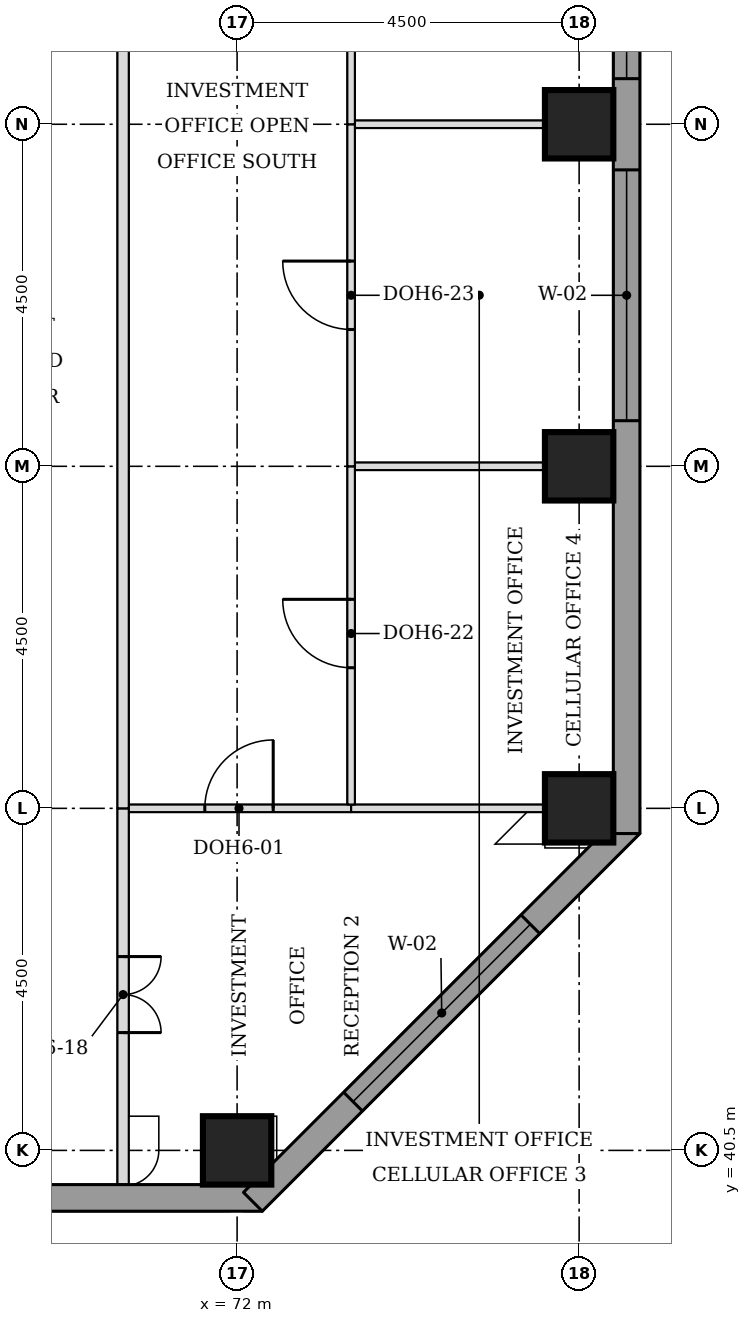
"""IFC4 building model, lengths in metres.
Left out: names, types, materials, properties, quantities, classifications, styles, units other than length and angle.
Written with IfcOpenShell. Run it as: python <this file> out.ifc"""

import sys

from ifc_helpers import new_model, si_unit, direction, frame, frame_2d, origin, origin_2d, place, context, subcontext, project, spatial, rectangle, extrude, element, fill, save


model = new_model("IFC4")
c1 = context("Model", 3, precision=1e-05, world=origin(), true_north=direction((0.0, 1.0)))
c2 = subcontext(c1, "Body", "Model", "MODEL_VIEW")
j1 = project(units=[si_unit("LENGTHUNIT", "METRE"), si_unit("PLANEANGLEUNIT", "RADIAN")], contexts=[c1])
p1 = place(None, origin())
s1 = spatial("IfcSite", under=j1, at=p1, CompositionType="ELEMENT")
p2 = place(p1, origin())
s2 = spatial("IfcBuilding", under=s1, at=p2, CompositionType="ELEMENT")
p3 = place(p2, frame((0.0, 0.0, 188.4)))
s3 = spatial("IfcBuildingStorey", under=s2, at=p3, CompositionType="ELEMENT", Elevation=188.4)
for number, where, z_axis, x_axis in (
    (1, (72.0, 40.5, 0.0), (0.0, 0.0, 1.0), (1.0, 0.0, 0.0)),
    (2, (76.5, 45.0, 0.0), (0.0, 0.0, 1.0), (1.0, 0.0, 0.0)),
    (3, (76.5, 49.5, 0.0), (0.0, 0.0, 1.0), (1.0, 0.0, 0.0)),
    (4, (76.5, 54.0, 0.0), (0.0, 0.0, 1.0), (1.0, 0.0, 0.0)),
):
    element("IfcColumn", number, at=place(p3, frame(where, z_axis=z_axis, x_axis=x_axis)), inside=s3, PredefinedType="COLUMN", context=c2, shape_type="SweptSolid", body=[
        extrude(rectangle(XDim=0.9, YDim=0.9, at=origin_2d()), origin(), (0.0, 0.0, 1.0), 3.7),
    ])
p4 = place(p3, frame((36.0, 39.875, 0.0), z_axis=(0.0, 0.0, 1.0), x_axis=(1.0, 0.0, 0.0)))
e5 = element("IfcWall", 5, at=p4, inside=s3, PredefinedType="STANDARD", context=c2, shape_type="SweptSolid", body=[
    extrude(rectangle(XDim=36.331, YDim=0.35, at=frame_2d((18.166, 0.0))), origin(), (0.0, 0.0, 1.0), 3.525),
])
p5 = place(p4, frame((5.1, 0.0, 0.9)))
e6 = element("IfcOpeningElement", 6, at=p5, cuts=e5, PredefinedType="OPENING", context=c2, shape_type="SweptSolid", body=[
    extrude(rectangle(XDim=3.3, YDim=1.9, at=frame_2d((1.65, 0.95))), frame((0.0, 0.185, 0.0), z_axis=(0.0, -1.0, 0.0), x_axis=(1.0, 0.0, 0.0)), (0.0, 0.0, 1.0), 0.37),
])
p6 = place(p4, frame((9.6, 0.0, 0.9)))
e7 = element("IfcOpeningElement", 7, at=p6, cuts=e5, PredefinedType="OPENING", context=c2, shape_type="SweptSolid", body=[
    extrude(rectangle(XDim=3.3, YDim=1.9, at=frame_2d((1.65, 0.95))), frame((0.0, 0.185, 0.0), z_axis=(0.0, -1.0, 0.0), x_axis=(1.0, 0.0, 0.0)), (0.0, 0.0, 1.0), 0.37),
])
p7 = place(p4, frame((14.1, 0.0, 0.9)))
e8 = element("IfcOpeningElement", 8, at=p7, cuts=e5, PredefinedType="OPENING", context=c2, shape_type="SweptSolid", body=[
    extrude(rectangle(XDim=3.3, YDim=1.9, at=frame_2d((1.65, 0.95))), frame((0.0, 0.185, 0.0), z_axis=(0.0, -1.0, 0.0), x_axis=(1.0, 0.0, 0.0)), (0.0, 0.0, 1.0), 0.37),
])
p8 = place(p4, frame((18.6, 0.0, 0.9)))
e9 = element("IfcOpeningElement", 9, at=p8, cuts=e5, PredefinedType="OPENING", context=c2, shape_type="SweptSolid", body=[
    extrude(rectangle(XDim=3.3, YDim=1.9, at=frame_2d((1.65, 0.95))), frame((0.0, 0.185, 0.0), z_axis=(0.0, -1.0, 0.0), x_axis=(1.0, 0.0, 0.0)), (0.0, 0.0, 1.0), 0.37),
])
p9 = place(p4, frame((23.1, 0.0, 0.9)))
e10 = element("IfcOpeningElement", 10, at=p9, cuts=e5, PredefinedType="OPENING", context=c2, shape_type="SweptSolid", body=[
    extrude(rectangle(XDim=3.3, YDim=1.9, at=frame_2d((1.65, 0.95))), frame((0.0, 0.185, 0.0), z_axis=(0.0, -1.0, 0.0), x_axis=(1.0, 0.0, 0.0)), (0.0, 0.0, 1.0), 0.37),
])
p10 = place(p4, frame((27.6, 0.0, 0.9)))
e11 = element("IfcOpeningElement", 11, at=p10, cuts=e5, PredefinedType="OPENING", context=c2, shape_type="SweptSolid", body=[
    extrude(rectangle(XDim=3.3, YDim=1.9, at=frame_2d((1.65, 0.95))), frame((0.0, 0.185, 0.0), z_axis=(0.0, -1.0, 0.0), x_axis=(1.0, 0.0, 0.0)), (0.0, 0.0, 1.0), 0.37),
])
p11 = place(p3, frame((72.208, 39.824, 0.0), z_axis=(0.0, 0.0, 1.0), x_axis=(0.707106781187, 0.707106781187, 0.0)))
e12 = element("IfcWall", 12, at=p11, inside=s3, PredefinedType="STANDARD", context=c2, shape_type="SweptSolid", body=[
    extrude(rectangle(XDim=7.027, YDim=0.35, at=frame_2d((3.513, 0.0))), origin(), (0.0, 0.0, 1.0), 3.525),
])
p12 = place(p11, frame((1.863, 0.0, 0.9)))
e13 = element("IfcOpeningElement", 13, at=p12, cuts=e12, PredefinedType="OPENING", context=c2, shape_type="SweptSolid", body=[
    extrude(rectangle(XDim=3.3, YDim=1.9, at=frame_2d((1.65, 0.95))), frame((0.0, 0.185, 0.0), z_axis=(0.0, -1.0, 0.0), x_axis=(1.0, 0.0, 0.0)), (0.0, 0.0, 1.0), 0.37),
])
p13 = place(p3, frame((77.125, 44.669, 0.0), z_axis=(0.0, 0.0, 1.0), x_axis=(0.0, 1.0, 0.0)))
e14 = element("IfcWall", 14, at=p13, inside=s3, PredefinedType="STANDARD", context=c2, shape_type="SweptSolid", body=[
    extrude(rectangle(XDim=32.163, YDim=0.35, at=frame_2d((16.081, 0.0))), origin(), (0.0, 0.0, 1.0), 3.525),
])
p14 = place(p13, frame((5.431, 0.0, 0.9)))
e15 = element("IfcOpeningElement", 15, at=p14, cuts=e14, PredefinedType="OPENING", context=c2, shape_type="SweptSolid", body=[
    extrude(rectangle(XDim=3.3, YDim=1.9, at=frame_2d((1.65, 0.95))), frame((0.0, 0.185, 0.0), z_axis=(0.0, -1.0, 0.0), x_axis=(1.0, 0.0, 0.0)), (0.0, 0.0, 1.0), 0.37),
])
p15 = place(p13, frame((9.931, 0.0, 0.9)))
e16 = element("IfcOpeningElement", 16, at=p15, cuts=e14, PredefinedType="OPENING", context=c2, shape_type="SweptSolid", body=[
    extrude(rectangle(XDim=3.3, YDim=1.9, at=frame_2d((1.65, 0.95))), frame((0.0, 0.185, 0.0), z_axis=(0.0, -1.0, 0.0), x_axis=(1.0, 0.0, 0.0)), (0.0, 0.0, 1.0), 0.37),
])
p16 = place(p13, frame((14.431, 0.0, 0.9)))
e17 = element("IfcOpeningElement", 17, at=p16, cuts=e14, PredefinedType="OPENING", context=c2, shape_type="SweptSolid", body=[
    extrude(rectangle(XDim=3.3, YDim=1.9, at=frame_2d((1.65, 0.95))), frame((0.0, 0.185, 0.0), z_axis=(0.0, -1.0, 0.0), x_axis=(1.0, 0.0, 0.0)), (0.0, 0.0, 1.0), 0.37),
])
p17 = place(p13, frame((18.931, 0.0, 0.9)))
e18 = element("IfcOpeningElement", 18, at=p17, cuts=e14, PredefinedType="OPENING", context=c2, shape_type="SweptSolid", body=[
    extrude(rectangle(XDim=3.3, YDim=1.9, at=frame_2d((1.65, 0.95))), frame((0.0, 0.185, 0.0), z_axis=(0.0, -1.0, 0.0), x_axis=(1.0, 0.0, 0.0)), (0.0, 0.0, 1.0), 0.37),
])
p18 = place(p13, frame((23.431, 0.0, 0.9)))
e19 = element("IfcOpeningElement", 19, at=p18, cuts=e14, PredefinedType="OPENING", context=c2, shape_type="SweptSolid", body=[
    extrude(rectangle(XDim=3.3, YDim=1.9, at=frame_2d((1.65, 0.95))), frame((0.0, 0.185, 0.0), z_axis=(0.0, -1.0, 0.0), x_axis=(1.0, 0.0, 0.0)), (0.0, 0.0, 1.0), 0.37),
])
p19 = place(p3, frame((70.575, 45.0, 0.0), z_axis=(0.0, 0.0, 1.0), x_axis=(1.0, 0.0, 0.0)))
e20 = element("IfcWall", 20, at=p19, inside=s3, PredefinedType="PARTITIONING", context=c2, shape_type="SweptSolid", body=[
    extrude(rectangle(XDim=2.925, YDim=0.1, at=frame_2d((1.462, 0.0))), origin(), (0.0, 0.0, 1.0), 3.096),
])
p20 = place(p19, frame((1.0, 0.0, 0.0)))
e21 = element("IfcOpeningElement", 21, at=p20, cuts=e20, PredefinedType="OPENING", context=c2, shape_type="SweptSolid", body=[
    extrude(rectangle(XDim=0.9, YDim=2.1, at=frame_2d((0.45, 1.05))), frame((0.0, 0.06, 0.0), z_axis=(0.0, -1.0, 0.0), x_axis=(1.0, 0.0, 0.0)), (0.0, 0.0, 1.0), 0.12),
])
p21 = place(p3, frame((73.5, 45.0, 0.0), z_axis=(0.0, 0.0, 1.0), x_axis=(1.0, 0.0, 0.0)))
e22 = element("IfcWall", 22, at=p21, inside=s3, PredefinedType="PARTITIONING", context=c2, shape_type="SweptSolid", body=[
    extrude(rectangle(XDim=2.55, YDim=0.1, at=frame_2d((1.275, 0.0))), origin(), (0.0, 0.0, 1.0), 3.096),
])
for number, where, z_axis, x_axis in (
    (23, (73.55, 49.5, 0.0), (0.0, 0.0, 1.0), (1.0, 0.0, 0.0)),
    (24, (73.55, 54.0, 0.0), (0.0, 0.0, 1.0), (1.0, 0.0, 0.0)),
):
    element("IfcWall", number, at=place(p3, frame(where, z_axis=z_axis, x_axis=x_axis)), inside=s3, PredefinedType="PARTITIONING", context=c2, shape_type="SweptSolid", body=[
        extrude(rectangle(XDim=3.4, YDim=0.1, at=frame_2d((1.7, 0.0))), origin(), (0.0, 0.0, 1.0), 3.55),
    ])
p22 = place(p3, frame((70.5, 40.05, 0.0), z_axis=(0.0, 0.0, 1.0), x_axis=(0.0, 1.0, 0.0)))
e25 = element("IfcWall", 25, at=p22, inside=s3, PredefinedType="PARTITIONING", context=c2, shape_type="SweptSolid", body=[
    extrude(rectangle(XDim=4.95, YDim=0.15, at=frame_2d((2.475, 0.0))), origin(), (0.0, 0.0, 1.0), 3.55),
])
p23 = place(p22, frame((2.0, 0.0, 0.0)))
e26 = element("IfcOpeningElement", 26, at=p23, cuts=e25, PredefinedType="OPENING", context=c2, shape_type="SweptSolid", body=[
    extrude(rectangle(XDim=1.0, YDim=2.1, at=frame_2d((0.5, 1.05))), frame((0.0, 0.085, 0.0), z_axis=(0.0, -1.0, 0.0), x_axis=(1.0, 0.0, 0.0)), (0.0, 0.0, 1.0), 0.17),
])
p24 = place(p3, frame((70.5, 45.0, 0.0), z_axis=(0.0, 0.0, 1.0), x_axis=(0.0, 1.0, 0.0)))
e27 = element("IfcWall", 27, at=p24, inside=s3, PredefinedType="PARTITIONING", context=c2, shape_type="SweptSolid", body=[
    extrude(rectangle(XDim=21.0, YDim=0.15, at=frame_2d((10.5, 0.0))), origin(), (0.0, 0.0, 1.0), 3.55),
])
p25 = place(p3, frame((73.5, 45.05, 0.0), z_axis=(0.0, 0.0, 1.0), x_axis=(0.0, 1.0, 0.0)))
e28 = element("IfcWall", 28, at=p25, inside=s3, PredefinedType="PARTITIONING", context=c2, shape_type="SweptSolid", body=[
    extrude(rectangle(XDim=4.45, YDim=0.1, at=frame_2d((2.225, 0.0))), origin(), (0.0, 0.0, 1.0), 3.55),
])
p26 = place(p25, frame((1.8, 0.0, 0.0)))
e29 = element("IfcOpeningElement", 29, at=p26, cuts=e28, PredefinedType="OPENING", context=c2, shape_type="SweptSolid", body=[
    extrude(rectangle(XDim=0.9, YDim=2.1, at=frame_2d((0.45, 1.05))), frame((0.0, 0.06, 0.0), z_axis=(0.0, -1.0, 0.0), x_axis=(1.0, 0.0, 0.0)), (0.0, 0.0, 1.0), 0.12),
])
p27 = place(p3, frame((73.5, 49.5, 0.0), z_axis=(0.0, 0.0, 1.0), x_axis=(0.0, 1.0, 0.0)))
e30 = element("IfcWall", 30, at=p27, inside=s3, PredefinedType="PARTITIONING", context=c2, shape_type="SweptSolid", body=[
    extrude(rectangle(XDim=4.5, YDim=0.1, at=frame_2d((2.25, 0.0))), origin(), (0.0, 0.0, 1.0), 3.55),
])
p28 = place(p27, frame((1.8, 0.0, 0.0)))
e31 = element("IfcOpeningElement", 31, at=p28, cuts=e30, PredefinedType="OPENING", context=c2, shape_type="SweptSolid", body=[
    extrude(rectangle(XDim=0.9, YDim=2.1, at=frame_2d((0.45, 1.05))), frame((0.0, 0.06, 0.0), z_axis=(0.0, -1.0, 0.0), x_axis=(1.0, 0.0, 0.0)), (0.0, 0.0, 1.0), 0.12),
])
p29 = place(p3, frame((73.5, 54.0, 0.0), z_axis=(0.0, 0.0, 1.0), x_axis=(0.0, 1.0, 0.0)))
e32 = element("IfcWall", 32, at=p29, inside=s3, PredefinedType="PARTITIONING", context=c2, shape_type="SweptSolid", body=[
    extrude(rectangle(XDim=4.5, YDim=0.1, at=frame_2d((2.25, 0.0))), origin(), (0.0, 0.0, 1.0), 3.55),
])
p30 = place(p29, frame((1.8, 0.0, 0.0)))
e33 = element("IfcOpeningElement", 33, at=p30, cuts=e32, PredefinedType="OPENING", context=c2, shape_type="SweptSolid", body=[
    extrude(rectangle(XDim=0.9, YDim=2.1, at=frame_2d((0.45, 1.05))), frame((0.0, 0.06, 0.0), z_axis=(0.0, -1.0, 0.0), x_axis=(1.0, 0.0, 0.0)), (0.0, 0.0, 1.0), 0.12),
])
p31 = place(p12, origin())
e34 = element("IfcWindow", 34, at=p31, inside=s3, PartitioningType="SINGLE_PANEL", PredefinedType="WINDOW", context=c2, shape_type="SweptSolid", body=[
    extrude(rectangle(XDim=3.3, YDim=1.9, at=frame_2d((1.65, 0.95))), frame((0.0, 0.085, 0.0), z_axis=(0.0, -1.0, 0.0), x_axis=(1.0, 0.0, 0.0)), (0.0, 0.0, 1.0), 0.06),
])
fill(e13, e34)
p32 = place(p14, origin())
e35 = element("IfcWindow", 35, at=p32, inside=s3, PartitioningType="SINGLE_PANEL", PredefinedType="WINDOW", context=c2, shape_type="SweptSolid", body=[
    extrude(rectangle(XDim=3.3, YDim=1.9, at=frame_2d((1.65, 0.95))), frame((0.0, 0.085, 0.0), z_axis=(0.0, -1.0, 0.0), x_axis=(1.0, 0.0, 0.0)), (0.0, 0.0, 1.0), 0.06),
])
fill(e15, e35)
p33 = place(p15, origin())
e36 = element("IfcWindow", 36, at=p33, inside=s3, PartitioningType="SINGLE_PANEL", PredefinedType="WINDOW", context=c2, shape_type="SweptSolid", body=[
    extrude(rectangle(XDim=3.3, YDim=1.9, at=frame_2d((1.65, 0.95))), frame((0.0, 0.085, 0.0), z_axis=(0.0, -1.0, 0.0), x_axis=(1.0, 0.0, 0.0)), (0.0, 0.0, 1.0), 0.06),
])
fill(e16, e36)
p34 = place(p23, frame((1.0, 0.0, 0.0), z_axis=(0.0, 0.0, 1.0), x_axis=(-1.0, 0.0, 0.0)))
e37 = element("IfcDoor", 37, at=p34, inside=s3, OperationType="DOUBLE_DOOR_SINGLE_SWING", PredefinedType="DOOR", context=c2, shape_type="SweptSolid", body=[
    extrude(rectangle(XDim=1.0, YDim=2.1, at=frame_2d((0.5, 1.05))), frame((0.0, 0.025, 0.0), z_axis=(0.0, -1.0, 0.0), x_axis=(1.0, 0.0, 0.0)), (0.0, 0.0, 1.0), 0.05),
])
fill(e26, e37)
p35 = place(p20, origin())
e38 = element("IfcDoor", 38, at=p35, inside=s3, OperationType="SINGLE_SWING_RIGHT", PredefinedType="DOOR", context=c2, shape_type="SweptSolid", body=[
    extrude(rectangle(XDim=0.9, YDim=2.1, at=frame_2d((0.45, 1.05))), frame((0.0, 0.025, 0.0), z_axis=(0.0, -1.0, 0.0), x_axis=(1.0, 0.0, 0.0)), (0.0, 0.0, 1.0), 0.05),
])
fill(e21, e38)
p36 = place(p26, origin())
e39 = element("IfcDoor", 39, at=p36, inside=s3, OperationType="SINGLE_SWING_RIGHT", PredefinedType="DOOR", context=c2, shape_type="SweptSolid", body=[
    extrude(rectangle(XDim=0.9, YDim=2.1, at=frame_2d((0.45, 1.05))), frame((0.0, 0.025, 0.0), z_axis=(0.0, -1.0, 0.0), x_axis=(1.0, 0.0, 0.0)), (0.0, 0.0, 1.0), 0.05),
])
fill(e29, e39)
p37 = place(p28, origin())
e40 = element("IfcDoor", 40, at=p37, inside=s3, OperationType="SINGLE_SWING_RIGHT", PredefinedType="DOOR", context=c2, shape_type="SweptSolid", body=[
    extrude(rectangle(XDim=0.9, YDim=2.1, at=frame_2d((0.45, 1.05))), frame((0.0, 0.025, 0.0), z_axis=(0.0, -1.0, 0.0), x_axis=(1.0, 0.0, 0.0)), (0.0, 0.0, 1.0), 0.05),
])
fill(e31, e40)
save(model, sys.argv[1])
